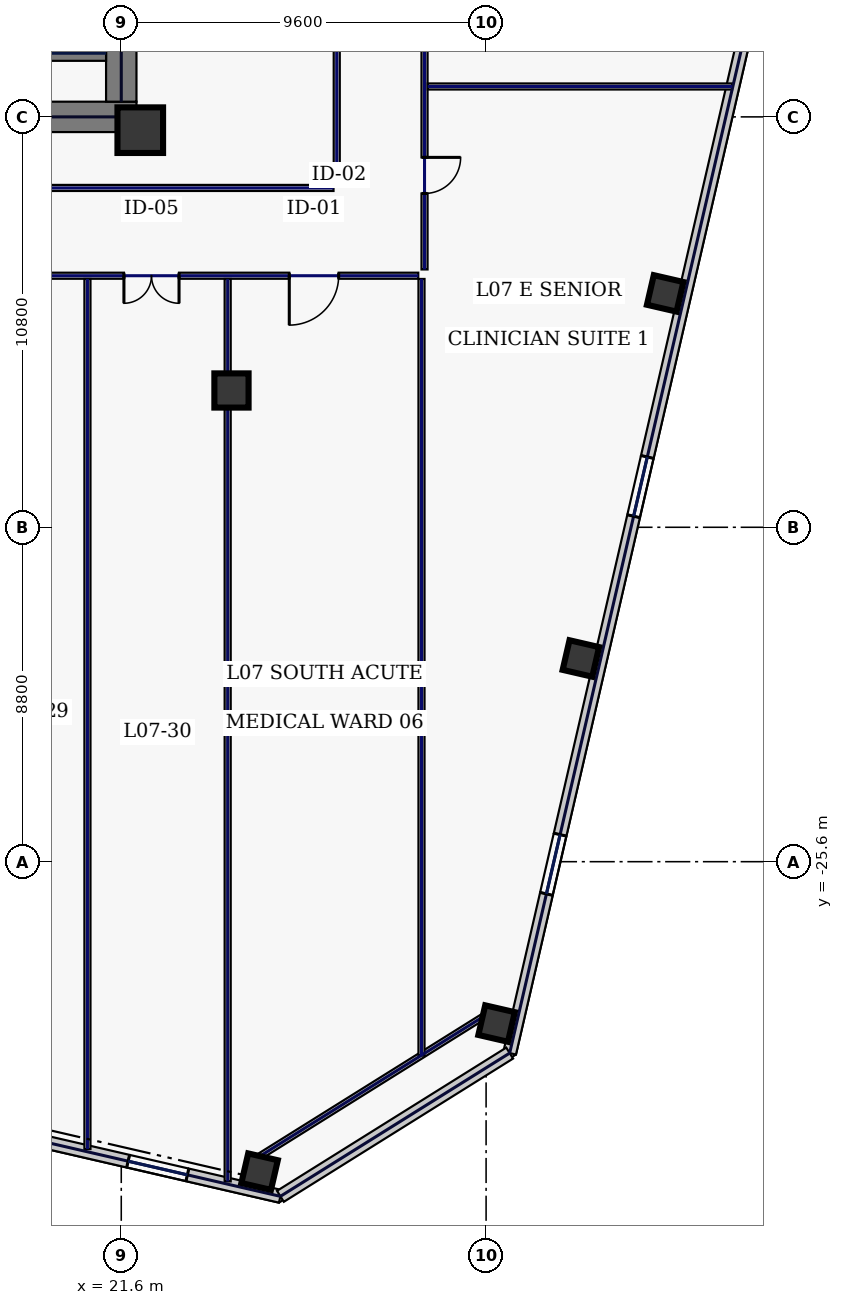
"""IFC4 building model, lengths in metres.
Left out: names, types, materials, properties, quantities, classifications, styles, units other than length and angle.
Written with IfcOpenShell. Run it as: python <this file> out.ifc"""

import sys

from ifc_helpers import new_model, si_unit, direction, frame, frame_2d, origin, origin_2d, place, context, subcontext, project, spatial, rectangle, hollow_rectangle, extrude, element, fill, save


model = new_model("IFC4")
c1 = context("Model", 3, precision=1e-05, world=origin(), true_north=direction((0.0, 1.0)))
c2 = subcontext(c1, "Body", "Model", "MODEL_VIEW")
j1 = project(units=[si_unit("LENGTHUNIT", "METRE"), si_unit("PLANEANGLEUNIT", "RADIAN")], contexts=[c1])
p1 = place(None, origin())
s1 = spatial("IfcSite", under=j1, at=p1, CompositionType="ELEMENT")
p2 = place(p1, origin())
s2 = spatial("IfcBuilding", under=s1, at=p2, CompositionType="ELEMENT")
p3 = place(p2, frame((0.0, 0.0, 39.4)))
s3 = spatial("IfcBuildingStorey", under=s2, at=p3, CompositionType="ELEMENT", Elevation=39.4)
p4 = place(p3, frame((10.4, -6.0, 0.0), z_axis=(0.0, 0.0, 1.0), x_axis=(1.0, 0.0, 0.0)))
e1 = element("IfcWall", 1, at=p4, inside=s3, PredefinedType="SHEAR", context=c2, shape_type="SweptSolid", body=[
    extrude(rectangle(XDim=11.6, YDim=0.8, at=frame_2d((5.8, 0.0))), origin(), (0.0, 0.0, 1.0), 3.74),
])
p5 = place(p3, frame((21.6, -5.6, 0.0), z_axis=(0.0, 0.0, 1.0), x_axis=(0.0, 1.0, 0.0)))
e2 = element("IfcWall", 2, at=p5, inside=s3, PredefinedType="SHEAR", context=c2, shape_type="SweptSolid", body=[
    extrude(rectangle(XDim=11.2, YDim=0.8, at=frame_2d((5.6, 0.0))), origin(), (0.0, 0.0, 1.0), 3.74),
])
p6 = place(p3, frame((17.8, -4.325, 0.0), z_axis=(0.0, 0.0, 1.0), x_axis=(1.0, 0.0, 0.0)))
e3 = element("IfcWall", 3, at=p6, inside=s3, PredefinedType="SHEAR", context=c2, shape_type="SweptSolid", body=[
    extrude(rectangle(XDim=3.4, YDim=0.4, at=frame_2d((1.7, 0.0))), origin(), (0.0, 0.0, 1.0), 3.74),
])
p7 = place(p3, frame((22.1, -6.35, 0.0), z_axis=(0.0, 0.0, 1.0), x_axis=(1.0, 0.0, 0.0)))
e4 = element("IfcColumn", 4, at=p7, inside=s3, PredefinedType="COLUMN", context=c2, shape_type="SweptSolid", body=[
    extrude(hollow_rectangle(XDim=1.2, YDim=1.2, WallThickness=0.05, at=origin_2d()), origin(), (0.0, 0.0, 1.0), 3.74),
])
p8 = place(p3, frame((24.5, -13.2, 0.0), z_axis=(0.0, 0.0, 1.0), x_axis=(1.0, 0.0, 0.0)))
e5 = element("IfcColumn", 5, at=p8, inside=s3, PredefinedType="COLUMN", context=c2, shape_type="SweptSolid", body=[
    extrude(hollow_rectangle(XDim=0.9, YDim=0.9, WallThickness=0.04, at=origin_2d()), origin(), (0.0, 0.0, 1.0), 3.74),
])
for number, where, z_axis, x_axis in (
    (6, (25.24, -33.757, 0.0), (0.0, 0.0, 1.0), (0.974, -0.225, 0.0)),
    (7, (31.476, -29.86, 0.0), (0.0, 0.0, 1.0), (0.974, -0.225, 0.0)),
    (8, (33.694, -20.252, 0.0), (0.0, 0.0, 1.0), (0.974, -0.225, 0.0)),
    (9, (35.912, -10.645, 0.0), (0.0, 0.0, 1.0), (0.974, -0.225, 0.0)),
):
    element("IfcColumn", number, at=place(p3, frame(where, z_axis=z_axis, x_axis=x_axis)), inside=s3, PredefinedType="COLUMN", context=c2, shape_type="SweptSolid", body=[
        extrude(hollow_rectangle(XDim=0.8, YDim=0.8, WallThickness=0.036, at=origin_2d()), origin(), (0.0, 0.0, 1.0), 3.74),
    ])
p9 = place(p3, frame((3.717, -29.311, 0.0), z_axis=(0.0, 0.0, 1.0), x_axis=(0.97436993772, -0.224951604723, 0.0)))
e10 = element("IfcWall", 10, at=p9, inside=s3, PredefinedType="STANDARD", context=c2, shape_type="SweptSolid", body=[
    extrude(rectangle(XDim=22.651, YDim=0.34, at=frame_2d((11.326, 0.0))), origin(), (0.0, 0.0, 1.0), 3.74),
])
p10 = place(p9, frame((8.791, 0.0, 0.22)))
e11 = element("IfcOpeningElement", 11, at=p10, cuts=e10, PredefinedType="OPENING", context=c2, shape_type="SweptSolid", body=[
    extrude(rectangle(XDim=1.6, YDim=1.2, at=frame_2d((0.8, 0.6))), frame((0.0, 0.18, 0.0), z_axis=(0.0, -1.0, 0.0), x_axis=(1.0, 0.0, 0.0)), (0.0, 0.0, 1.0), 0.36),
])
p11 = place(p9, frame((14.055, 0.0, 0.22)))
e12 = element("IfcOpeningElement", 12, at=p11, cuts=e10, PredefinedType="OPENING", context=c2, shape_type="SweptSolid", body=[
    extrude(rectangle(XDim=1.6, YDim=1.2, at=frame_2d((0.8, 0.6))), frame((0.0, 0.18, 0.0), z_axis=(0.0, -1.0, 0.0), x_axis=(1.0, 0.0, 0.0)), (0.0, 0.0, 1.0), 0.36),
])
p12 = place(p9, frame((18.539, 0.0, 0.22)))
e13 = element("IfcOpeningElement", 13, at=p12, cuts=e10, PredefinedType="OPENING", context=c2, shape_type="SweptSolid", body=[
    extrude(rectangle(XDim=1.6, YDim=1.2, at=frame_2d((0.8, 0.6))), frame((0.0, 0.18, 0.0), z_axis=(0.0, -1.0, 0.0), x_axis=(1.0, 0.0, 0.0)), (0.0, 0.0, 1.0), 0.36),
])
p13 = place(p3, frame((31.82, -30.637, 0.0), z_axis=(0.0, 0.0, 1.0), x_axis=(0.224949969076, 0.974370315338, 0.0)))
e14 = element("IfcWall", 14, at=p13, inside=s3, PredefinedType="STANDARD", context=c2, shape_type="SweptSolid", body=[
    extrude(rectangle(XDim=40.8, YDim=0.34, at=frame_2d((20.4, 0.0))), origin(), (0.0, 0.0, 1.0), 3.74),
])
p14 = place(p13, frame((4.3, 0.0, 0.22)))
e15 = element("IfcOpeningElement", 15, at=p14, cuts=e14, PredefinedType="OPENING", context=c2, shape_type="SweptSolid", body=[
    extrude(rectangle(XDim=1.6, YDim=1.2, at=frame_2d((0.8, 0.6))), frame((0.0, 0.18, 0.0), z_axis=(0.0, -1.0, 0.0), x_axis=(1.0, 0.0, 0.0)), (0.0, 0.0, 1.0), 0.36),
])
p15 = place(p13, frame((14.5, 0.0, 0.22)))
e16 = element("IfcOpeningElement", 16, at=p15, cuts=e14, PredefinedType="OPENING", context=c2, shape_type="SweptSolid", body=[
    extrude(rectangle(XDim=1.6, YDim=1.2, at=frame_2d((0.8, 0.6))), frame((0.0, 0.18, 0.0), z_axis=(0.0, -1.0, 0.0), x_axis=(1.0, 0.0, 0.0)), (0.0, 0.0, 1.0), 0.36),
])
p16 = place(p3, frame((25.788, -34.406, 0.0), z_axis=(0.0, 0.0, 1.0), x_axis=(0.848046504656, 0.529921811158, 0.0)))
e17 = element("IfcWall", 17, at=p16, inside=s3, PredefinedType="STANDARD", context=c2, shape_type="SweptSolid", body=[
    extrude(rectangle(XDim=7.113, YDim=0.34, at=frame_2d((3.557, 0.0))), origin(), (0.0, 0.0, 1.0), 3.74),
])
p17 = place(p3, frame((25.06, -33.468, 0.0), z_axis=(0.0, 0.0, 1.0), x_axis=(0.848043064089, 0.529927317139, 0.0)))
e18 = element("IfcWall", 18, at=p17, inside=s3, PredefinedType="PARTITIONING", context=c2, shape_type="SweptSolid", body=[
    extrude(rectangle(XDim=7.354, YDim=0.16, at=frame_2d((3.677, 0.0))), origin(), (0.0, 0.0, 1.0), 1.535),
])
p18 = place(p3, frame((29.58, 10.115, 0.0), z_axis=(0.0, 0.0, 1.0), x_axis=(0.0, -1.0, 0.0)))
e19 = element("IfcWall", 19, at=p18, inside=s3, PredefinedType="PARTITIONING", context=c2, shape_type="SweptSolid", body=[
    extrude(rectangle(XDim=20.13, YDim=0.16, at=frame_2d((10.065, 0.0))), origin(), (0.0, 0.0, 1.0), 3.74),
])
p19 = place(p18, frame((17.181, 0.0, 0.0)))
e20 = element("IfcOpeningElement", 20, at=p19, cuts=e19, PredefinedType="OPENING", context=c2, shape_type="SweptSolid", body=[
    extrude(rectangle(XDim=0.95, YDim=2.2, at=frame_2d((0.475, 1.1))), frame((0.0, 0.09, 0.0), z_axis=(0.0, -1.0, 0.0), x_axis=(1.0, 0.0, 0.0)), (0.0, 0.0, 1.0), 0.18),
])
p20 = place(p18, frame((12.325, 0.0, 0.0)))
e21 = element("IfcOpeningElement", 21, at=p20, cuts=e19, PredefinedType="OPENING", context=c2, shape_type="SweptSolid", body=[
    extrude(rectangle(XDim=0.95, YDim=2.2, at=frame_2d((0.475, 1.1))), frame((0.0, 0.09, 0.0), z_axis=(0.0, -1.0, 0.0), x_axis=(1.0, 0.0, 0.0)), (0.0, 0.0, 1.0), 0.18),
])
p21 = place(p18, frame((7.125, 0.0, 0.0)))
e22 = element("IfcOpeningElement", 22, at=p21, cuts=e19, PredefinedType="OPENING", context=c2, shape_type="SweptSolid", body=[
    extrude(rectangle(XDim=0.95, YDim=2.2, at=frame_2d((0.475, 1.1))), frame((0.0, 0.09, 0.0), z_axis=(0.0, -1.0, 0.0), x_axis=(1.0, 0.0, 0.0)), (0.0, 0.0, 1.0), 0.18),
])
p22 = place(p18, frame((2.219, 0.0, 0.0)))
e23 = element("IfcOpeningElement", 23, at=p22, cuts=e19, PredefinedType="OPENING", context=c2, shape_type="SweptSolid", body=[
    extrude(rectangle(XDim=0.95, YDim=2.2, at=frame_2d((0.475, 1.1))), frame((0.0, 0.09, 0.0), z_axis=(0.0, -1.0, 0.0), x_axis=(1.0, 0.0, 0.0)), (0.0, 0.0, 1.0), 0.18),
])
p23 = place(p3, frame((29.415, -10.18, 0.0), z_axis=(0.0, 0.0, 1.0), x_axis=(-1.0, 0.0, 0.0)))
e24 = element("IfcWall", 24, at=p23, inside=s3, PredefinedType="PARTITIONING", context=c2, shape_type="SweptSolid", body=[
    extrude(rectangle(XDim=58.83, YDim=0.16, at=frame_2d((29.415, 0.0))), origin(), (0.0, 0.0, 1.0), 3.74),
])
p24 = place(p23, frame((55.106, 0.0, 0.0)))
e25 = element("IfcOpeningElement", 25, at=p24, cuts=e24, PredefinedType="OPENING", context=c2, shape_type="SweptSolid", body=[
    extrude(rectangle(XDim=1.3, YDim=2.2, at=frame_2d((0.65, 1.1))), frame((0.0, 0.09, 0.0), z_axis=(0.0, -1.0, 0.0), x_axis=(1.0, 0.0, 0.0)), (0.0, 0.0, 1.0), 0.18),
])
p25 = place(p23, frame((49.05, 0.0, 0.0)))
e26 = element("IfcOpeningElement", 26, at=p25, cuts=e24, PredefinedType="OPENING", context=c2, shape_type="SweptSolid", body=[
    extrude(rectangle(XDim=0.95, YDim=2.2, at=frame_2d((0.475, 1.1))), frame((0.0, 0.09, 0.0), z_axis=(0.0, -1.0, 0.0), x_axis=(1.0, 0.0, 0.0)), (0.0, 0.0, 1.0), 0.18),
])
p26 = place(p23, frame((42.75, 0.0, 0.0)))
e27 = element("IfcOpeningElement", 27, at=p26, cuts=e24, PredefinedType="OPENING", context=c2, shape_type="SweptSolid", body=[
    extrude(rectangle(XDim=1.05, YDim=2.2, at=frame_2d((0.525, 1.1))), frame((0.0, 0.09, 0.0), z_axis=(0.0, -1.0, 0.0), x_axis=(1.0, 0.0, 0.0)), (0.0, 0.0, 1.0), 0.18),
])
p27 = place(p23, frame((36.2, 0.0, 0.0)))
e28 = element("IfcOpeningElement", 28, at=p27, cuts=e24, PredefinedType="OPENING", context=c2, shape_type="SweptSolid", body=[
    extrude(rectangle(XDim=0.95, YDim=2.2, at=frame_2d((0.475, 1.1))), frame((0.0, 0.09, 0.0), z_axis=(0.0, -1.0, 0.0), x_axis=(1.0, 0.0, 0.0)), (0.0, 0.0, 1.0), 0.18),
])
p28 = place(p23, frame((29.4, 0.0, 0.0)))
e29 = element("IfcOpeningElement", 29, at=p28, cuts=e24, PredefinedType="OPENING", context=c2, shape_type="SweptSolid", body=[
    extrude(rectangle(XDim=0.95, YDim=2.2, at=frame_2d((0.475, 1.1))), frame((0.0, 0.09, 0.0), z_axis=(0.0, -1.0, 0.0), x_axis=(1.0, 0.0, 0.0)), (0.0, 0.0, 1.0), 0.18),
])
p29 = place(p23, frame((22.67, 0.0, 0.0)))
e30 = element("IfcOpeningElement", 30, at=p29, cuts=e24, PredefinedType="OPENING", context=c2, shape_type="SweptSolid", body=[
    extrude(rectangle(XDim=0.95, YDim=2.2, at=frame_2d((0.475, 1.1))), frame((0.0, 0.09, 0.0), z_axis=(0.0, -1.0, 0.0), x_axis=(1.0, 0.0, 0.0)), (0.0, 0.0, 1.0), 0.18),
])
p30 = place(p23, frame((16.01, 0.0, 0.0)))
e31 = element("IfcOpeningElement", 31, at=p30, cuts=e24, PredefinedType="OPENING", context=c2, shape_type="SweptSolid", body=[
    extrude(rectangle(XDim=0.95, YDim=2.2, at=frame_2d((0.475, 1.1))), frame((0.0, 0.09, 0.0), z_axis=(0.0, -1.0, 0.0), x_axis=(1.0, 0.0, 0.0)), (0.0, 0.0, 1.0), 0.18),
])
p31 = place(p23, frame((10.61, 0.0, 0.0)))
e32 = element("IfcOpeningElement", 32, at=p31, cuts=e24, PredefinedType="OPENING", context=c2, shape_type="SweptSolid", body=[
    extrude(rectangle(XDim=1.05, YDim=2.2, at=frame_2d((0.525, 1.1))), frame((0.0, 0.09, 0.0), z_axis=(0.0, -1.0, 0.0), x_axis=(1.0, 0.0, 0.0)), (0.0, 0.0, 1.0), 0.18),
])
p32 = place(p23, frame((6.295, 0.0, 0.0)))
e33 = element("IfcOpeningElement", 33, at=p32, cuts=e24, PredefinedType="OPENING", context=c2, shape_type="SweptSolid", body=[
    extrude(rectangle(XDim=1.45, YDim=2.2, at=frame_2d((0.725, 1.1))), frame((0.0, 0.09, 0.0), z_axis=(0.0, -1.0, 0.0), x_axis=(1.0, 0.0, 0.0)), (0.0, 0.0, 1.0), 0.18),
])
p33 = place(p23, frame((2.094, 0.0, 0.0)))
e34 = element("IfcOpeningElement", 34, at=p33, cuts=e24, PredefinedType="OPENING", context=c2, shape_type="SweptSolid", body=[
    extrude(rectangle(XDim=1.3, YDim=2.2, at=frame_2d((0.65, 1.1))), frame((0.0, 0.09, 0.0), z_axis=(0.0, -1.0, 0.0), x_axis=(1.0, 0.0, 0.0)), (0.0, 0.0, 1.0), 0.18),
])
p34 = place(p3, frame((10.665, -7.87, 0.0), z_axis=(0.0, 0.0, 1.0), x_axis=(1.0, 0.0, 0.0)))
e35 = element("IfcWall", 35, at=p34, inside=s3, PredefinedType="PARTITIONING", context=c2, shape_type="SweptSolid", body=[
    extrude(rectangle(XDim=16.52, YDim=0.16, at=frame_2d((8.26, 0.0))), origin(), (0.0, 0.0, 1.0), 3.74),
])
p35 = place(p3, frame((27.27, -7.785, 0.0), z_axis=(0.0, 0.0, 1.0), x_axis=(0.0, 1.0, 0.0)))
e36 = element("IfcWall", 36, at=p35, inside=s3, PredefinedType="PARTITIONING", context=c2, shape_type="SweptSolid", body=[
    extrude(rectangle(XDim=15.67, YDim=0.16, at=frame_2d((7.835, 0.0))), origin(), (0.0, 0.0, 1.0), 3.74),
])
p36 = place(p3, frame((29.5, -30.703, 0.0), z_axis=(0.0, 0.0, 1.0), x_axis=(0.0, 1.0, 0.0)))
e37 = element("IfcWall", 37, at=p36, inside=s3, PredefinedType="PARTITIONING", context=c2, shape_type="SweptSolid", body=[
    extrude(rectangle(XDim=20.438, YDim=0.16, at=frame_2d((10.219, 0.0))), origin(), (0.0, 0.0, 1.0), 3.74),
])
p37 = place(p3, frame((24.4, -34.014, 0.0), z_axis=(0.0, 0.0, 1.0), x_axis=(0.0, 1.0, 0.0)))
e38 = element("IfcWall", 38, at=p37, inside=s3, PredefinedType="PARTITIONING", context=c2, shape_type="SweptSolid", body=[
    extrude(rectangle(XDim=23.75, YDim=0.16, at=frame_2d((11.875, 0.0))), origin(), (0.0, 0.0, 1.0), 3.235),
])
p38 = place(p3, frame((20.71, -33.162, 0.0), z_axis=(0.0, 0.0, 1.0), x_axis=(0.0, 1.0, 0.0)))
e39 = element("IfcWall", 39, at=p38, inside=s3, PredefinedType="PARTITIONING", context=c2, shape_type="SweptSolid", body=[
    extrude(rectangle(XDim=22.897, YDim=0.16, at=frame_2d((11.449, 0.0))), origin(), (0.0, 0.0, 1.0), 3.74),
])
p39 = place(p3, frame((29.665, -5.2, 0.0), z_axis=(0.0, 0.0, 1.0), x_axis=(1.0, 0.0, 0.0)))
e40 = element("IfcWall", 40, at=p39, inside=s3, PredefinedType="PARTITIONING", context=c2, shape_type="SweptSolid", body=[
    extrude(rectangle(XDim=8.007, YDim=0.16, at=frame_2d((4.003, 0.0))), origin(), (0.0, 0.0, 1.0), 3.74),
])
p40 = place(p12, origin())
e41 = element("IfcWindow", 41, at=p40, inside=s3, PartitioningType="SINGLE_PANEL", PredefinedType="WINDOW", context=c2, shape_type="SweptSolid", body=[
    extrude(rectangle(XDim=1.6, YDim=1.2, at=frame_2d((0.8, 0.6))), frame((0.0, 0.03, 0.0), z_axis=(0.0, -1.0, 0.0), x_axis=(1.0, 0.0, 0.0)), (0.0, 0.0, 1.0), 0.06),
])
fill(e13, e41)
p41 = place(p14, origin())
e42 = element("IfcWindow", 42, at=p41, inside=s3, PartitioningType="SINGLE_PANEL", PredefinedType="WINDOW", context=c2, shape_type="SweptSolid", body=[
    extrude(rectangle(XDim=1.6, YDim=1.2, at=frame_2d((0.8, 0.6))), frame((0.0, 0.03, 0.0), z_axis=(0.0, -1.0, 0.0), x_axis=(1.0, 0.0, 0.0)), (0.0, 0.0, 1.0), 0.06),
])
fill(e15, e42)
p42 = place(p15, origin())
e43 = element("IfcWindow", 43, at=p42, inside=s3, PartitioningType="SINGLE_PANEL", PredefinedType="WINDOW", context=c2, shape_type="SweptSolid", body=[
    extrude(rectangle(XDim=1.6, YDim=1.2, at=frame_2d((0.8, 0.6))), frame((0.0, 0.03, 0.0), z_axis=(0.0, -1.0, 0.0), x_axis=(1.0, 0.0, 0.0)), (0.0, 0.0, 1.0), 0.06),
])
fill(e16, e43)
p43 = place(p32, origin())
e44 = element("IfcDoor", 44, at=p43, inside=s3, OperationType="DOUBLE_SWING_LEFT", PredefinedType="DOOR", context=c2, shape_type="SweptSolid", body=[
    extrude(rectangle(XDim=1.45, YDim=2.2, at=frame_2d((0.725, 1.1))), frame((0.0, 0.025, 0.0), z_axis=(0.0, -1.0, 0.0), x_axis=(1.0, 0.0, 0.0)), (0.0, 0.0, 1.0), 0.05),
])
fill(e33, e44)
p44 = place(p33, origin())
e45 = element("IfcDoor", 45, at=p44, inside=s3, OperationType="SINGLE_SWING_RIGHT", PredefinedType="DOOR", context=c2, shape_type="SweptSolid", body=[
    extrude(rectangle(XDim=1.3, YDim=2.2, at=frame_2d((0.65, 1.1))), frame((0.0, 0.025, 0.0), z_axis=(0.0, -1.0, 0.0), x_axis=(1.0, 0.0, 0.0)), (0.0, 0.0, 1.0), 0.05),
])
fill(e34, e45)
p45 = place(p19, origin())
e46 = element("IfcDoor", 46, at=p45, inside=s3, OperationType="SINGLE_SWING_LEFT", PredefinedType="DOOR", context=c2, shape_type="SweptSolid", body=[
    extrude(rectangle(XDim=0.95, YDim=2.2, at=frame_2d((0.475, 1.1))), frame((0.0, 0.025, 0.0), z_axis=(0.0, -1.0, 0.0), x_axis=(1.0, 0.0, 0.0)), (0.0, 0.0, 1.0), 0.05),
])
fill(e20, e46)
save(model, sys.argv[1])
